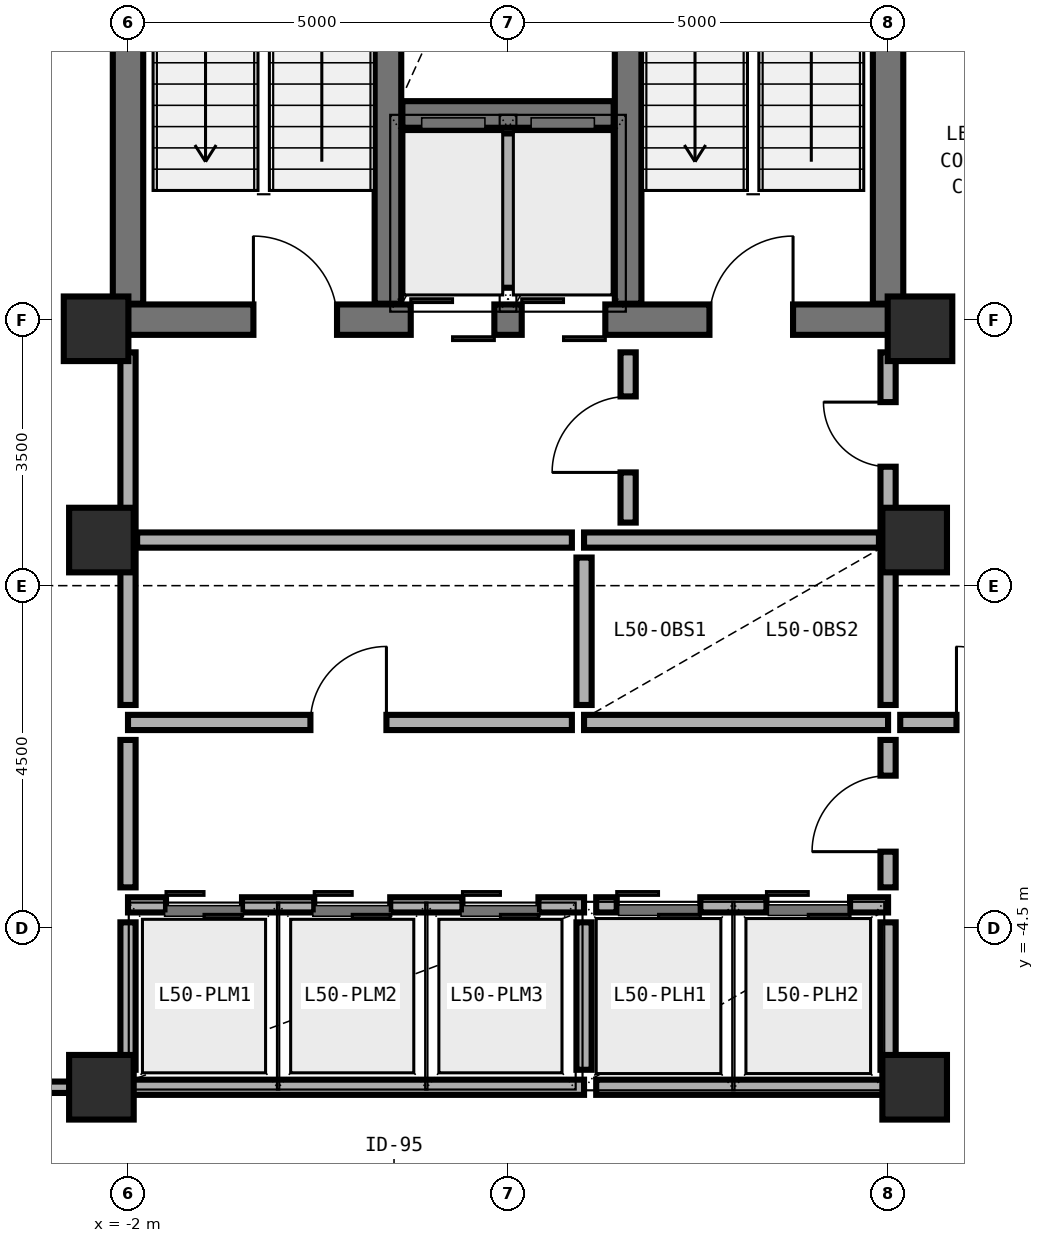
"""IFC4 building model, lengths in metres.
Left out: names, types, materials, properties, quantities, classifications, styles, units other than length and angle.
Written with IfcOpenShell. Run it as: python <this file> out.ifc"""

import sys

from ifc_helpers import new_model, si_unit, direction, frame, frame_2d, origin, origin_2d, place, context, subcontext, project, spatial, rectangle, extrude, element, fill, save


model = new_model("IFC4")
c1 = context("Model", 3, precision=1e-05, world=origin(), true_north=direction((0.0, 1.0)))
c2 = subcontext(c1, "Body", "Model", "MODEL_VIEW")
j1 = project(units=[si_unit("LENGTHUNIT", "METRE"), si_unit("PLANEANGLEUNIT", "RADIAN")], contexts=[c1])
p1 = place(None, origin())
s1 = spatial("IfcSite", under=j1, at=p1, CompositionType="ELEMENT")
p2 = place(p1, origin())
s2 = spatial("IfcBuilding", under=s1, at=p2, CompositionType="ELEMENT")
p3 = place(p2, frame((0.0, 0.0, 200.4)))
s3 = spatial("IfcBuildingStorey", under=s2, at=p3, CompositionType="ELEMENT", Elevation=200.4)
p4 = place(p3, frame((-2.0, 3.5, 0.0), z_axis=(0.0, 0.0, 1.0), x_axis=(1.0, 0.0, 0.0)))
e1 = element("IfcWall", 1, at=p4, inside=s3, PredefinedType="SHEAR", context=c2, shape_type="SweptSolid", body=[
    extrude(rectangle(XDim=10.0, YDim=0.4, at=frame_2d((5.0, 0.0))), origin(), (0.0, 0.0, 1.0), 3.592),
])
p5 = place(p4, frame((1.65, 0.0, 0.0)))
e2 = element("IfcOpeningElement", 2, at=p5, cuts=e1, PredefinedType="OPENING", context=c2, shape_type="SweptSolid", body=[
    extrude(rectangle(XDim=1.1, YDim=2.15, at=frame_2d((0.55, 1.075))), frame((0.0, 0.21, 0.0), z_axis=(0.0, -1.0, 0.0), x_axis=(1.0, 0.0, 0.0)), (0.0, 0.0, 1.0), 0.42),
])
p6 = place(p4, frame((7.65, 0.0, 0.0)))
e3 = element("IfcOpeningElement", 3, at=p6, cuts=e1, PredefinedType="OPENING", context=c2, shape_type="SweptSolid", body=[
    extrude(rectangle(XDim=1.1, YDim=2.15, at=frame_2d((0.55, 1.075))), frame((0.0, 0.21, 0.0), z_axis=(0.0, -1.0, 0.0), x_axis=(1.0, 0.0, 0.0)), (0.0, 0.0, 1.0), 0.42),
])
p7 = place(p4, frame((3.72, 0.0, 0.0)))
e4 = element("IfcOpeningElement", 4, at=p7, cuts=e1, PredefinedType="OPENING", context=c2, shape_type="SweptSolid", body=[
    extrude(rectangle(XDim=1.1, YDim=2.2, at=frame_2d((0.55, 1.1))), frame((0.0, 0.21, 0.0), z_axis=(0.0, -1.0, 0.0), x_axis=(1.0, 0.0, 0.0)), (0.0, 0.0, 1.0), 0.42),
])
p8 = place(p4, frame((5.18, 0.0, 0.0)))
e5 = element("IfcOpeningElement", 5, at=p8, cuts=e1, PredefinedType="OPENING", context=c2, shape_type="SweptSolid", body=[
    extrude(rectangle(XDim=1.1, YDim=2.2, at=frame_2d((0.55, 1.1))), frame((0.0, 0.21, 0.0), z_axis=(0.0, -1.0, 0.0), x_axis=(1.0, 0.0, 0.0)), (0.0, 0.0, 1.0), 0.42),
])
for number, where, z_axis, x_axis in (
    (6, (-2.0, 3.71, 0.0), (0.0, 0.0, 1.0), (0.0, 1.0, 0.0)),
    (7, (8.0, 3.71, 0.0), (0.0, 0.0, 1.0), (0.0, 1.0, 0.0)),
):
    element("IfcWall", number, at=place(p3, frame(where, z_axis=z_axis, x_axis=x_axis)), inside=s3, PredefinedType="SHEAR", context=c2, shape_type="SweptSolid", body=[
        extrude(rectangle(XDim=8.58, YDim=0.4, at=frame_2d((4.29, 0.0))), origin(), (0.0, 0.0, 1.0), 3.592),
    ])
for number, where, z_axis, x_axis in (
    (8, (1.42, 3.71, 0.0), (0.0, 0.0, 1.0), (0.0, 1.0, 0.0)),
    (9, (4.58, 3.71, 0.0), (0.0, 0.0, 1.0), (0.0, 1.0, 0.0)),
):
    element("IfcWall", number, at=place(p3, frame(where, z_axis=z_axis, x_axis=x_axis)), inside=s3, PredefinedType="SHEAR", context=c2, shape_type="SweptSolid", body=[
        extrude(rectangle(XDim=8.58, YDim=0.35, at=frame_2d((4.29, 0.0))), origin(), (0.0, 0.0, 1.0), 3.592),
    ])
p9 = place(p3, frame((1.61, 6.2, 0.0), z_axis=(0.0, 0.0, 1.0), x_axis=(1.0, 0.0, 0.0)))
e10 = element("IfcWall", 10, at=p9, inside=s3, PredefinedType="SHEAR", context=c2, shape_type="SweptSolid", body=[
    extrude(rectangle(XDim=2.78, YDim=0.35, at=frame_2d((1.39, 0.0))), origin(), (0.0, 0.0, 1.0), 3.592),
])
for number, where, z_axis, x_axis in (
    (11, (-2.42, 3.38, 0.0), (0.0, 0.0, 1.0), (1.0, 0.0, 0.0)),
    (12, (8.42, 3.38, 0.0), (0.0, 0.0, 1.0), (1.0, 0.0, 0.0)),
    (13, (-2.35, 0.6, 0.0), (0.0, 0.0, 1.0), (1.0, 0.0, 0.0)),
    (14, (8.35, 0.6, 0.0), (0.0, 0.0, 1.0), (1.0, 0.0, 0.0)),
    (15, (-2.35, -6.6, 0.0), (0.0, 0.0, 1.0), (1.0, 0.0, 0.0)),
    (16, (8.35, -6.6, 0.0), (0.0, 0.0, 1.0), (1.0, 0.0, 0.0)),
):
    element("IfcColumn", number, at=place(p3, frame(where, z_axis=z_axis, x_axis=x_axis)), inside=s3, PredefinedType="COLUMN", context=c2, shape_type="SweptSolid", body=[
        extrude(rectangle(XDim=0.85, YDim=0.85, at=origin_2d()), origin(), (0.0, 0.0, 1.0), 3.575),
    ])
p10 = place(p3, frame((3.0, 3.92, 0.0), z_axis=(0.0, 0.0, 1.0), x_axis=(0.0, 1.0, 0.0)))
e17 = element("IfcWall", 17, at=p10, inside=s3, PredefinedType="SOLIDWALL", context=c2, shape_type="SweptSolid", body=[
    extrude(rectangle(XDim=2.03, YDim=0.2, at=frame_2d((1.015, 0.0))), origin(), (0.0, 0.0, 1.0), 3.36),
])
p11 = place(p3, frame((4.0, 0.6, 0.0), z_axis=(0.0, 0.0, 1.0), x_axis=(1.0, 0.0, 0.0)))
e18 = element("IfcWall", 18, at=p11, inside=s3, PredefinedType="SOLIDWALL", context=c2, shape_type="SweptSolid", body=[
    extrude(rectangle(XDim=3.88, YDim=0.2, at=frame_2d((1.94, 0.0))), origin(), (0.0, 0.0, 1.0), 3.012),
])
p12 = place(p3, frame((4.0, -1.8, 0.0), z_axis=(0.0, 0.0, 1.0), x_axis=(1.0, 0.0, 0.0)))
e19 = element("IfcWall", 19, at=p12, inside=s3, PredefinedType="SOLIDWALL", context=c2, shape_type="SweptSolid", body=[
    extrude(rectangle(XDim=4.0, YDim=0.2, at=frame_2d((2.0, 0.0))), origin(), (0.0, 0.0, 1.0), 3.36),
])
p13 = place(p3, frame((4.0, -1.57, 0.0), z_axis=(0.0, 0.0, 1.0), x_axis=(0.0, 1.0, 0.0)))
e20 = element("IfcWall", 20, at=p13, inside=s3, PredefinedType="SOLIDWALL", context=c2, shape_type="SweptSolid", body=[
    extrude(rectangle(XDim=1.94, YDim=0.2, at=frame_2d((0.97, 0.0))), origin(), (0.0, 0.0, 1.0), 3.36),
])
p14 = place(p3, frame((8.0, -1.57, 0.0), z_axis=(0.0, 0.0, 1.0), x_axis=(0.0, 1.0, 0.0)))
e21 = element("IfcWall", 21, at=p14, inside=s3, PredefinedType="SOLIDWALL", context=c2, shape_type="SweptSolid", body=[
    extrude(rectangle(XDim=2.05, YDim=0.2, at=frame_2d((1.025, 0.0))), origin(), (0.0, 0.0, 1.0), 3.012),
])
p15 = place(p3, frame((-2.0, -4.2, 0.0), z_axis=(0.0, 0.0, 1.0), x_axis=(1.0, 0.0, 0.0)))
e22 = element("IfcWall", 22, at=p15, inside=s3, PredefinedType="SOLIDWALL", context=c2, shape_type="SweptSolid", body=[
    extrude(rectangle(XDim=6.0, YDim=0.2, at=frame_2d((3.0, 0.0))), origin(), (0.0, 0.0, 1.0), 3.36),
])
p16 = place(p15, frame((0.5, 0.0, 0.0)))
e23 = element("IfcOpeningElement", 23, at=p16, cuts=e22, PredefinedType="OPENING", context=c2, shape_type="SweptSolid", body=[
    extrude(rectangle(XDim=1.0, YDim=2.2, at=frame_2d((0.5, 1.1))), frame((0.0, 0.11, 0.0), z_axis=(0.0, -1.0, 0.0), x_axis=(1.0, 0.0, 0.0)), (0.0, 0.0, 1.0), 0.22),
])
p17 = place(p15, frame((2.45, 0.0, 0.0)))
e24 = element("IfcOpeningElement", 24, at=p17, cuts=e22, PredefinedType="OPENING", context=c2, shape_type="SweptSolid", body=[
    extrude(rectangle(XDim=1.0, YDim=2.2, at=frame_2d((0.5, 1.1))), frame((0.0, 0.11, 0.0), z_axis=(0.0, -1.0, 0.0), x_axis=(1.0, 0.0, 0.0)), (0.0, 0.0, 1.0), 0.22),
])
p18 = place(p15, frame((4.4, 0.0, 0.0)))
e25 = element("IfcOpeningElement", 25, at=p18, cuts=e22, PredefinedType="OPENING", context=c2, shape_type="SweptSolid", body=[
    extrude(rectangle(XDim=1.0, YDim=2.2, at=frame_2d((0.5, 1.1))), frame((0.0, 0.11, 0.0), z_axis=(0.0, -1.0, 0.0), x_axis=(1.0, 0.0, 0.0)), (0.0, 0.0, 1.0), 0.22),
])
p19 = place(p3, frame((-2.0, -6.6, 0.0), z_axis=(0.0, 0.0, 1.0), x_axis=(1.0, 0.0, 0.0)))
e26 = element("IfcWall", 26, at=p19, inside=s3, PredefinedType="SOLIDWALL", context=c2, shape_type="SweptSolid", body=[
    extrude(rectangle(XDim=6.0, YDim=0.2, at=frame_2d((3.0, 0.0))), origin(), (0.0, 0.0, 1.0), 3.012),
])
p20 = place(p3, frame((-2.0, -6.37, 0.0), z_axis=(0.0, 0.0, 1.0), x_axis=(0.0, 1.0, 0.0)))
e27 = element("IfcWall", 27, at=p20, inside=s3, PredefinedType="SOLIDWALL", context=c2, shape_type="SweptSolid", body=[
    extrude(rectangle(XDim=1.94, YDim=0.2, at=frame_2d((0.97, 0.0))), origin(), (0.0, 0.0, 1.0), 3.012),
])
p21 = place(p3, frame((4.16, -4.2, 0.0), z_axis=(0.0, 0.0, 1.0), x_axis=(1.0, 0.0, 0.0)))
e28 = element("IfcWall", 28, at=p21, inside=s3, PredefinedType="SOLIDWALL", context=c2, shape_type="SweptSolid", body=[
    extrude(rectangle(XDim=3.84, YDim=0.2, at=frame_2d((1.92, 0.0))), origin(), (0.0, 0.0, 1.0), 3.36),
])
p22 = place(p21, frame((0.27, 0.0, 0.0)))
e29 = element("IfcOpeningElement", 29, at=p22, cuts=e28, PredefinedType="OPENING", context=c2, shape_type="SweptSolid", body=[
    extrude(rectangle(XDim=1.1, YDim=2.2, at=frame_2d((0.55, 1.1))), frame((0.0, 0.11, 0.0), z_axis=(0.0, -1.0, 0.0), x_axis=(1.0, 0.0, 0.0)), (0.0, 0.0, 1.0), 0.22),
])
p23 = place(p21, frame((2.24, 0.0, 0.0)))
e30 = element("IfcOpeningElement", 30, at=p23, cuts=e28, PredefinedType="OPENING", context=c2, shape_type="SweptSolid", body=[
    extrude(rectangle(XDim=1.1, YDim=2.2, at=frame_2d((0.55, 1.1))), frame((0.0, 0.11, 0.0), z_axis=(0.0, -1.0, 0.0), x_axis=(1.0, 0.0, 0.0)), (0.0, 0.0, 1.0), 0.22),
])
p24 = place(p3, frame((4.16, -6.6, 0.0), z_axis=(0.0, 0.0, 1.0), x_axis=(1.0, 0.0, 0.0)))
e31 = element("IfcWall", 31, at=p24, inside=s3, PredefinedType="SOLIDWALL", context=c2, shape_type="SweptSolid", body=[
    extrude(rectangle(XDim=3.84, YDim=0.2, at=frame_2d((1.92, 0.0))), origin(), (0.0, 0.0, 1.0), 3.012),
])
p25 = place(p3, frame((4.0, -6.37, 0.0), z_axis=(0.0, 0.0, 1.0), x_axis=(0.0, 1.0, 0.0)))
e32 = element("IfcWall", 32, at=p25, inside=s3, PredefinedType="SOLIDWALL", context=c2, shape_type="SweptSolid", body=[
    extrude(rectangle(XDim=1.94, YDim=0.2, at=frame_2d((0.97, 0.0))), origin(), (0.0, 0.0, 1.0), 3.36),
])
p26 = place(p3, frame((8.0, -6.37, 0.0), z_axis=(0.0, 0.0, 1.0), x_axis=(0.0, 1.0, 0.0)))
e33 = element("IfcWall", 33, at=p26, inside=s3, PredefinedType="SOLIDWALL", context=c2, shape_type="SweptSolid", body=[
    extrude(rectangle(XDim=1.94, YDim=0.2, at=frame_2d((0.97, 0.0))), origin(), (0.0, 0.0, 1.0), 3.012),
])
p27 = place(p3, frame((4.58, 0.83, 0.0), z_axis=(0.0, 0.0, 1.0), x_axis=(0.0, 1.0, 0.0)))
e34 = element("IfcWall", 34, at=p27, inside=s3, PredefinedType="MOVABLE", context=c2, shape_type="SweptSolid", body=[
    extrude(rectangle(XDim=2.24, YDim=0.2, at=frame_2d((1.12, 0.0))), origin(), (0.0, 0.0, 1.0), 3.36),
])
p28 = place(p27, frame((0.66, 0.0, 0.0)))
e35 = element("IfcOpeningElement", 35, at=p28, cuts=e34, PredefinedType="OPENING", context=c2, shape_type="SweptSolid", body=[
    extrude(rectangle(XDim=1.0, YDim=2.1, at=frame_2d((0.5, 1.05))), frame((0.0, 0.11, 0.0), z_axis=(0.0, -1.0, 0.0), x_axis=(1.0, 0.0, 0.0)), (0.0, 0.0, 1.0), 0.22),
])
p29 = place(p3, frame((8.0, 0.72, 0.0), z_axis=(0.0, 0.0, 1.0), x_axis=(0.0, 1.0, 0.0)))
e36 = element("IfcWall", 36, at=p29, inside=s3, PredefinedType="MOVABLE", context=c2, shape_type="SweptSolid", body=[
    extrude(rectangle(XDim=2.35, YDim=0.2, at=frame_2d((1.175, 0.0))), origin(), (0.0, 0.0, 1.0), 2.692),
])
p30 = place(p29, frame((0.845, 0.0, 0.0)))
e37 = element("IfcOpeningElement", 37, at=p30, cuts=e36, PredefinedType="OPENING", context=c2, shape_type="SweptSolid", body=[
    extrude(rectangle(XDim=0.85, YDim=2.1, at=frame_2d((0.425, 1.05))), frame((0.0, 0.11, 0.0), z_axis=(0.0, -1.0, 0.0), x_axis=(1.0, 0.0, 0.0)), (0.0, 0.0, 1.0), 0.22),
])
p31 = place(p3, frame((8.0, -3.97, 0.0), z_axis=(0.0, 0.0, 1.0), x_axis=(0.0, 1.0, 0.0)))
e38 = element("IfcWall", 38, at=p31, inside=s3, PredefinedType="MOVABLE", context=c2, shape_type="SweptSolid", body=[
    extrude(rectangle(XDim=1.94, YDim=0.2, at=frame_2d((0.97, 0.0))), origin(), (0.0, 0.0, 1.0), 3.012),
])
p32 = place(p31, frame((0.47, 0.0, 0.0)))
e39 = element("IfcOpeningElement", 39, at=p32, cuts=e38, PredefinedType="OPENING", context=c2, shape_type="SweptSolid", body=[
    extrude(rectangle(XDim=1.0, YDim=2.1, at=frame_2d((0.5, 1.05))), frame((0.0, 0.11, 0.0), z_axis=(0.0, -1.0, 0.0), x_axis=(1.0, 0.0, 0.0)), (0.0, 0.0, 1.0), 0.22),
])
p33 = place(p3, frame((-2.0, -1.8, 0.0), z_axis=(0.0, 0.0, 1.0), x_axis=(1.0, 0.0, 0.0)))
e40 = element("IfcWall", 40, at=p33, inside=s3, PredefinedType="MOVABLE", context=c2, shape_type="SweptSolid", body=[
    extrude(rectangle(XDim=5.84, YDim=0.2, at=frame_2d((2.92, 0.0))), origin(), (0.0, 0.0, 1.0), 3.36),
])
p34 = place(p33, frame((2.4, 0.0, 0.0)))
e41 = element("IfcOpeningElement", 41, at=p34, cuts=e40, PredefinedType="OPENING", context=c2, shape_type="SweptSolid", body=[
    extrude(rectangle(XDim=1.0, YDim=2.1, at=frame_2d((0.5, 1.05))), frame((0.0, 0.11, 0.0), z_axis=(0.0, -1.0, 0.0), x_axis=(1.0, 0.0, 0.0)), (0.0, 0.0, 1.0), 0.22),
])
p35 = place(p3, frame((8.16, -1.8, 0.0), z_axis=(0.0, 0.0, 1.0), x_axis=(1.0, 0.0, 0.0)))
e42 = element("IfcWall", 42, at=p35, inside=s3, PredefinedType="MOVABLE", context=c2, shape_type="SweptSolid", body=[
    extrude(rectangle(XDim=2.64, YDim=0.2, at=frame_2d((1.32, 0.0))), origin(), (0.0, 0.0, 1.0), 3.36),
])
p36 = place(p35, frame((0.74, 0.0, 0.0)))
e43 = element("IfcOpeningElement", 43, at=p36, cuts=e42, PredefinedType="OPENING", context=c2, shape_type="SweptSolid", body=[
    extrude(rectangle(XDim=1.0, YDim=2.1, at=frame_2d((0.5, 1.05))), frame((0.0, 0.11, 0.0), z_axis=(0.0, -1.0, 0.0), x_axis=(1.0, 0.0, 0.0)), (0.0, 0.0, 1.0), 0.22),
])
p37 = place(p3, frame((-2.16, -6.6, 0.0), z_axis=(0.0, 0.0, 1.0), x_axis=(-1.0, 0.0, 0.0)))
e44 = element("IfcWall", 44, at=p37, inside=s3, PredefinedType="PARTITIONING", context=c2, shape_type="SweptSolid", body=[
    extrude(rectangle(XDim=10.34, YDim=0.15, at=frame_2d((5.17, 0.0))), origin(), (0.0, 0.0, 1.0), 2.842),
])
p38 = place(p37, frame((4.615, 0.0, 0.0)))
e45 = element("IfcOpeningElement", 45, at=p38, cuts=e44, PredefinedType="OPENING", context=c2, shape_type="SweptSolid", body=[
    extrude(rectangle(XDim=0.95, YDim=2.1, at=frame_2d((0.475, 1.05))), frame((0.0, 0.085, 0.0), z_axis=(0.0, -1.0, 0.0), x_axis=(1.0, 0.0, 0.0)), (0.0, 0.0, 1.0), 0.17),
])
p39 = place(p3, frame((-1.88, 0.6, 0.0), z_axis=(0.0, 0.0, 1.0), x_axis=(1.0, 0.0, 0.0)))
e46 = element("IfcWall", 46, at=p39, inside=s3, PredefinedType="MOVABLE", context=c2, shape_type="SweptSolid", body=[
    extrude(rectangle(XDim=5.72, YDim=0.2, at=frame_2d((2.86, 0.0))), origin(), (0.0, 0.0, 1.0), 3.012),
])
p40 = place(p3, frame((-2.0, 0.72, 0.0), z_axis=(0.0, 0.0, 1.0), x_axis=(0.0, 1.0, 0.0)))
e47 = element("IfcWall", 47, at=p40, inside=s3, PredefinedType="MOVABLE", context=c2, shape_type="SweptSolid", body=[
    extrude(rectangle(XDim=2.35, YDim=0.2, at=frame_2d((1.175, 0.0))), origin(), (0.0, 0.0, 1.0), 2.692),
])
p41 = place(p3, frame((-2.0, -3.97, 0.0), z_axis=(0.0, 0.0, 1.0), x_axis=(0.0, 1.0, 0.0)))
e48 = element("IfcWall", 48, at=p41, inside=s3, PredefinedType="MOVABLE", context=c2, shape_type="SweptSolid", body=[
    extrude(rectangle(XDim=1.94, YDim=0.2, at=frame_2d((0.97, 0.0))), origin(), (0.0, 0.0, 1.0), 3.012),
])
p42 = place(p3, frame((-2.0, -1.57, 0.0), z_axis=(0.0, 0.0, 1.0), x_axis=(0.0, 1.0, 0.0)))
e49 = element("IfcWall", 49, at=p42, inside=s3, PredefinedType="MOVABLE", context=c2, shape_type="SweptSolid", body=[
    extrude(rectangle(XDim=2.05, YDim=0.2, at=frame_2d((1.025, 0.0))), origin(), (0.0, 0.0, 1.0), 3.012),
])
p43 = place(p5, origin())
e50 = element("IfcDoor", 50, at=p43, inside=s3, OperationType="SINGLE_SWING_LEFT", PredefinedType="DOOR", context=c2, shape_type="SweptSolid", body=[
    extrude(rectangle(XDim=1.1, YDim=2.15, at=frame_2d((0.55, 1.075))), frame((0.0, 0.025, 0.0), z_axis=(0.0, -1.0, 0.0), x_axis=(1.0, 0.0, 0.0)), (0.0, 0.0, 1.0), 0.05),
])
fill(e2, e50)
p44 = place(p6, origin())
e51 = element("IfcDoor", 51, at=p44, inside=s3, OperationType="SINGLE_SWING_RIGHT", PredefinedType="DOOR", context=c2, shape_type="SweptSolid", body=[
    extrude(rectangle(XDim=1.1, YDim=2.15, at=frame_2d((0.55, 1.075))), frame((0.0, 0.025, 0.0), z_axis=(0.0, -1.0, 0.0), x_axis=(1.0, 0.0, 0.0)), (0.0, 0.0, 1.0), 0.05),
])
fill(e3, e51)
p45 = place(p7, origin())
e52 = element("IfcDoor", 52, at=p45, inside=s3, OperationType="DOUBLE_DOOR_SLIDING", PredefinedType="DOOR", context=c2, shape_type="SweptSolid", body=[
    extrude(rectangle(XDim=1.1, YDim=2.2, at=frame_2d((0.55, 1.1))), frame((0.0, 0.025, 0.0), z_axis=(0.0, -1.0, 0.0), x_axis=(1.0, 0.0, 0.0)), (0.0, 0.0, 1.0), 0.05),
])
fill(e4, e52)
p46 = place(p8, origin())
e53 = element("IfcDoor", 53, at=p46, inside=s3, OperationType="DOUBLE_DOOR_SLIDING", PredefinedType="DOOR", context=c2, shape_type="SweptSolid", body=[
    extrude(rectangle(XDim=1.1, YDim=2.2, at=frame_2d((0.55, 1.1))), frame((0.0, 0.025, 0.0), z_axis=(0.0, -1.0, 0.0), x_axis=(1.0, 0.0, 0.0)), (0.0, 0.0, 1.0), 0.05),
])
fill(e5, e53)
p47 = place(p28, origin())
e54 = element("IfcDoor", 54, at=p47, inside=s3, OperationType="SINGLE_SWING_LEFT", PredefinedType="DOOR", context=c2, shape_type="SweptSolid", body=[
    extrude(rectangle(XDim=1.0, YDim=2.1, at=frame_2d((0.5, 1.05))), frame((0.0, 0.025, 0.0), z_axis=(0.0, -1.0, 0.0), x_axis=(1.0, 0.0, 0.0)), (0.0, 0.0, 1.0), 0.05),
])
fill(e35, e54)
p48 = place(p30, origin())
e55 = element("IfcDoor", 55, at=p48, inside=s3, OperationType="SINGLE_SWING_RIGHT", PredefinedType="DOOR", context=c2, shape_type="SweptSolid", body=[
    extrude(rectangle(XDim=0.85, YDim=2.1, at=frame_2d((0.425, 1.05))), frame((0.0, 0.025, 0.0), z_axis=(0.0, -1.0, 0.0), x_axis=(1.0, 0.0, 0.0)), (0.0, 0.0, 1.0), 0.05),
])
fill(e37, e55)
p49 = place(p32, origin())
e56 = element("IfcDoor", 56, at=p49, inside=s3, OperationType="SINGLE_SWING_LEFT", PredefinedType="DOOR", context=c2, shape_type="SweptSolid", body=[
    extrude(rectangle(XDim=1.0, YDim=2.1, at=frame_2d((0.5, 1.05))), frame((0.0, 0.025, 0.0), z_axis=(0.0, -1.0, 0.0), x_axis=(1.0, 0.0, 0.0)), (0.0, 0.0, 1.0), 0.05),
])
fill(e39, e56)
p50 = place(p34, origin())
e57 = element("IfcDoor", 57, at=p50, inside=s3, OperationType="SINGLE_SWING_RIGHT", PredefinedType="DOOR", context=c2, shape_type="SweptSolid", body=[
    extrude(rectangle(XDim=1.0, YDim=2.1, at=frame_2d((0.5, 1.05))), frame((0.0, 0.025, 0.0), z_axis=(0.0, -1.0, 0.0), x_axis=(1.0, 0.0, 0.0)), (0.0, 0.0, 1.0), 0.05),
])
fill(e41, e57)
p51 = place(p36, origin())
e58 = element("IfcDoor", 58, at=p51, inside=s3, OperationType="SINGLE_SWING_LEFT", PredefinedType="DOOR", context=c2, shape_type="SweptSolid", body=[
    extrude(rectangle(XDim=1.0, YDim=2.1, at=frame_2d((0.5, 1.05))), frame((0.0, 0.025, 0.0), z_axis=(0.0, -1.0, 0.0), x_axis=(1.0, 0.0, 0.0)), (0.0, 0.0, 1.0), 0.05),
])
fill(e43, e58)
p52 = place(p16, origin())
e59 = element("IfcDoor", 59, at=p52, inside=s3, OperationType="DOUBLE_DOOR_SLIDING", PredefinedType="DOOR", context=c2, shape_type="SweptSolid", body=[
    extrude(rectangle(XDim=1.0, YDim=2.2, at=frame_2d((0.5, 1.1))), frame((0.0, 0.025, 0.0), z_axis=(0.0, -1.0, 0.0), x_axis=(1.0, 0.0, 0.0)), (0.0, 0.0, 1.0), 0.05),
])
fill(e23, e59)
p53 = place(p17, origin())
e60 = element("IfcDoor", 60, at=p53, inside=s3, OperationType="DOUBLE_DOOR_SLIDING", PredefinedType="DOOR", context=c2, shape_type="SweptSolid", body=[
    extrude(rectangle(XDim=1.0, YDim=2.2, at=frame_2d((0.5, 1.1))), frame((0.0, 0.025, 0.0), z_axis=(0.0, -1.0, 0.0), x_axis=(1.0, 0.0, 0.0)), (0.0, 0.0, 1.0), 0.05),
])
fill(e24, e60)
p54 = place(p18, origin())
e61 = element("IfcDoor", 61, at=p54, inside=s3, OperationType="DOUBLE_DOOR_SLIDING", PredefinedType="DOOR", context=c2, shape_type="SweptSolid", body=[
    extrude(rectangle(XDim=1.0, YDim=2.2, at=frame_2d((0.5, 1.1))), frame((0.0, 0.025, 0.0), z_axis=(0.0, -1.0, 0.0), x_axis=(1.0, 0.0, 0.0)), (0.0, 0.0, 1.0), 0.05),
])
fill(e25, e61)
p55 = place(p22, origin())
e62 = element("IfcDoor", 62, at=p55, inside=s3, OperationType="DOUBLE_DOOR_SLIDING", PredefinedType="DOOR", context=c2, shape_type="SweptSolid", body=[
    extrude(rectangle(XDim=1.1, YDim=2.2, at=frame_2d((0.55, 1.1))), frame((0.0, 0.025, 0.0), z_axis=(0.0, -1.0, 0.0), x_axis=(1.0, 0.0, 0.0)), (0.0, 0.0, 1.0), 0.05),
])
fill(e29, e62)
p56 = place(p23, origin())
e63 = element("IfcDoor", 63, at=p56, inside=s3, OperationType="DOUBLE_DOOR_SLIDING", PredefinedType="DOOR", context=c2, shape_type="SweptSolid", body=[
    extrude(rectangle(XDim=1.1, YDim=2.2, at=frame_2d((0.55, 1.1))), frame((0.0, 0.025, 0.0), z_axis=(0.0, -1.0, 0.0), x_axis=(1.0, 0.0, 0.0)), (0.0, 0.0, 1.0), 0.05),
])
fill(e30, e63)
save(model, sys.argv[1])
